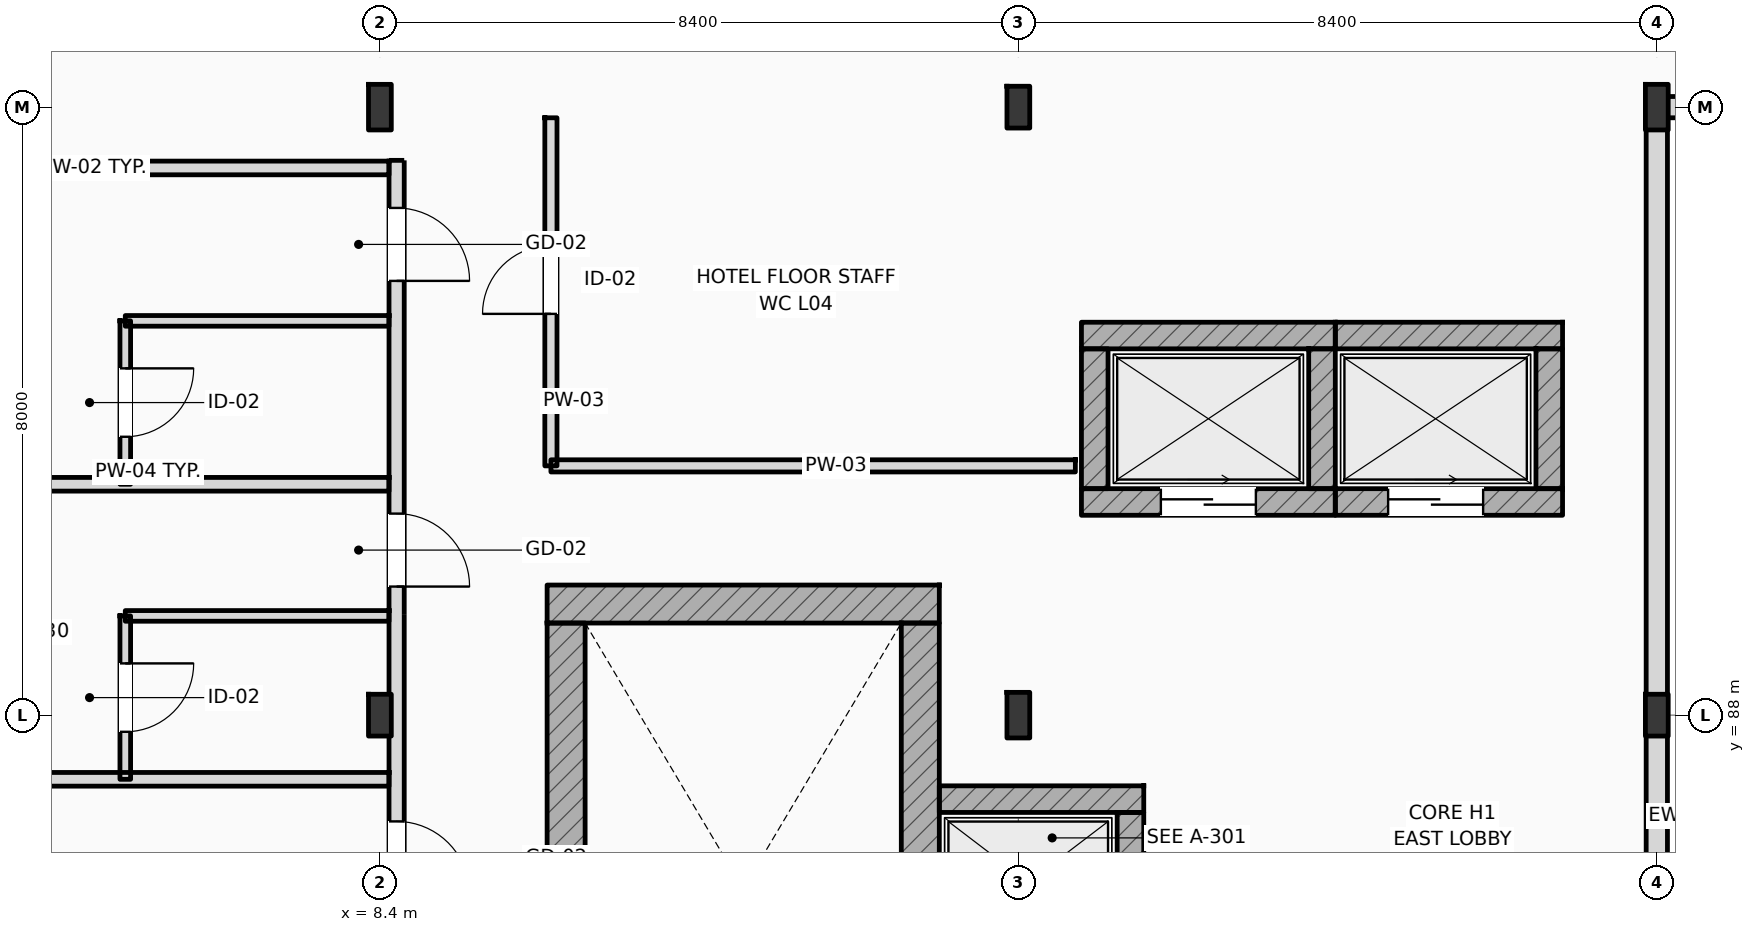
"""IFC4 building model, lengths in metres.
Left out: names, types, materials, properties, quantities, classifications, styles, units other than length and angle.
Written with IfcOpenShell. Run it as: python <this file> out.ifc"""

import sys

from ifc_helpers import new_model, si_unit, direction, frame, frame_2d, origin, origin_2d, place, context, subcontext, project, spatial, rectangle, i_section, extrude, element, fill, save


model = new_model("IFC4")
c1 = context("Model", 3, precision=1e-05, world=origin(), true_north=direction((0.0, 1.0)))
c2 = subcontext(c1, "Body", "Model", "MODEL_VIEW")
j1 = project(units=[si_unit("LENGTHUNIT", "METRE"), si_unit("PLANEANGLEUNIT", "RADIAN")], contexts=[c1])
p1 = place(None, origin())
s1 = spatial("IfcSite", under=j1, at=p1, CompositionType="ELEMENT")
p2 = place(p1, origin())
s2 = spatial("IfcBuilding", under=s1, at=p2, CompositionType="ELEMENT")
p3 = place(p2, frame((0.0, 0.0, 20.4)))
s3 = spatial("IfcBuildingStorey", under=s2, at=p3, CompositionType="ELEMENT", Elevation=20.4)
p4 = place(p3, frame((8.4, 88.0, 0.0), z_axis=(0.0, 0.0, 1.0), x_axis=(1.0, 0.0, 0.0)))
e1 = element("IfcColumn", 1, at=p4, inside=s3, PredefinedType="COLUMN", context=c2, shape_type="SweptSolid", body=[
    extrude(i_section(OverallWidth=0.3, OverallDepth=0.55, WebThickness=0.015, FlangeThickness=0.029, FilletRadius=0.027, at=origin_2d()), origin(), (0.0, 0.0, 1.0), 4.2),
])
for number, where, z_axis, x_axis in (
    (2, (8.4, 96.0, 0.0), (0.0, 0.0, 1.0), (1.0, 0.0, 0.0)),
    (3, (16.8, 88.0, 0.0), (0.0, 0.0, 1.0), (1.0, 0.0, 0.0)),
):
    element("IfcColumn", number, at=place(p3, frame(where, z_axis=z_axis, x_axis=x_axis)), inside=s3, PredefinedType="COLUMN", context=c2, shape_type="SweptSolid", body=[
        extrude(i_section(OverallWidth=0.3, OverallDepth=0.6, WebThickness=0.015, FlangeThickness=0.03, FilletRadius=0.027, at=origin_2d()), origin(), (0.0, 0.0, 1.0), 4.2),
    ])
for number, where, z_axis, x_axis in (
    (4, (16.8, 96.0, 0.0), (0.0, 0.0, 1.0), (1.0, 0.0, 0.0)),
    (5, (25.2, 88.0, 0.0), (0.0, 0.0, 1.0), (1.0, 0.0, 0.0)),
):
    element("IfcColumn", number, at=place(p3, frame(where, z_axis=z_axis, x_axis=x_axis)), inside=s3, PredefinedType="COLUMN", context=c2, shape_type="SweptSolid", body=[
        extrude(i_section(OverallWidth=0.3, OverallDepth=0.55, WebThickness=0.015, FlangeThickness=0.029, FilletRadius=0.027, at=origin_2d()), origin(), (0.0, 0.0, 1.0), 4.2),
    ])
p5 = place(p3, frame((25.2, 96.0, 0.0), z_axis=(0.0, 0.0, 1.0), x_axis=(1.0, 0.0, 0.0)))
e6 = element("IfcColumn", 6, at=p5, inside=s3, PredefinedType="COLUMN", context=c2, shape_type="SweptSolid", body=[
    extrude(i_section(OverallWidth=0.3, OverallDepth=0.6, WebThickness=0.015, FlangeThickness=0.03, FilletRadius=0.027, at=origin_2d()), origin(), (0.0, 0.0, 1.0), 4.2),
])
p6 = place(p3, frame((10.6, 89.462, 0.0), z_axis=(0.0, 0.0, 1.0), x_axis=(1.0, 0.0, 0.0)))
e7 = element("IfcWall", 7, at=p6, inside=s3, PredefinedType="SHEAR", context=c2, shape_type="SweptSolid", body=[
    extrude(rectangle(XDim=5.16, YDim=0.5, at=frame_2d((2.58, 0.0))), origin(), (0.0, 0.0, 1.0), 4.2),
])
p7 = place(p3, frame((10.85, 80.1, 0.0), z_axis=(0.0, 0.0, 1.0), x_axis=(0.0, 1.0, 0.0)))
e8 = element("IfcWall", 8, at=p7, inside=s3, PredefinedType="SHEAR", context=c2, shape_type="SweptSolid", body=[
    extrude(rectangle(XDim=9.112, YDim=0.5, at=frame_2d((4.556, 0.0))), origin(), (0.0, 0.0, 1.0), 4.2),
])
p8 = place(p3, frame((15.51, 80.1, 0.0), z_axis=(0.0, 0.0, 1.0), x_axis=(0.0, 1.0, 0.0)))
e9 = element("IfcWall", 9, at=p8, inside=s3, PredefinedType="SHEAR", context=c2, shape_type="SweptSolid", body=[
    extrude(rectangle(XDim=9.112, YDim=0.5, at=frame_2d((4.556, 0.0))), origin(), (0.0, 0.0, 1.0), 4.2),
])
p9 = place(p8, frame((0.44, 0.0, 0.0)))
e10 = element("IfcOpeningElement", 10, at=p9, cuts=e9, PredefinedType="OPENING", context=c2, shape_type="SweptSolid", body=[
    extrude(rectangle(XDim=1.1, YDim=2.2, at=frame_2d((0.55, 1.1))), frame((0.0, 0.26, 0.0), z_axis=(0.0, -1.0, 0.0), x_axis=(1.0, 0.0, 0.0)), (0.0, 0.0, 1.0), 0.52),
])
p10 = place(p3, frame((25.2, 96.0, 0.0), z_axis=(0.0, 0.0, 1.0), x_axis=(1.0, 0.0, 0.0)))
e11 = element("IfcWall", 11, at=p10, inside=s3, PredefinedType="STANDARD", context=c2, shape_type="SweptSolid", body=[
    extrude(rectangle(XDim=23.4, YDim=0.28, at=frame_2d((11.7, 0.0))), origin(), (0.0, 0.0, 1.0), 3.48),
])
p11 = place(p3, frame((25.2, 79.5, 0.0), z_axis=(0.0, 0.0, 1.0), x_axis=(0.0, 1.0, 0.0)))
e12 = element("IfcWall", 12, at=p11, inside=s3, PredefinedType="STANDARD", context=c2, shape_type="SweptSolid", body=[
    extrude(rectangle(XDim=16.5, YDim=0.28, at=frame_2d((8.25, 0.0))), origin(), (0.0, 0.0, 1.0), 3.53),
])
p12 = place(p3, frame((15.76, 86.895, 0.0), z_axis=(0.0, 0.0, 1.0), x_axis=(1.0, 0.0, 0.0)))
e13 = element("IfcWall", 13, at=p12, inside=s3, PredefinedType="SHEAR", context=c2, shape_type="SweptSolid", body=[
    extrude(rectangle(XDim=2.69, YDim=0.35, at=frame_2d((1.345, 0.0))), origin(), (0.0, 0.0, 1.0), 3.94),
])
p13 = place(p3, frame((18.275, 84.88, 0.0), z_axis=(0.0, 0.0, 1.0), x_axis=(0.0, 1.0, 0.0)))
e14 = element("IfcWall", 14, at=p13, inside=s3, PredefinedType="SHEAR", context=c2, shape_type="SweptSolid", body=[
    extrude(rectangle(XDim=1.84, YDim=0.35, at=frame_2d((0.92, 0.0))), origin(), (0.0, 0.0, 1.0), 3.94),
])
p14 = place(p3, frame((17.63, 92.995, 0.0), z_axis=(0.0, 0.0, 1.0), x_axis=(1.0, 0.0, 0.0)))
e15 = element("IfcWall", 15, at=p14, inside=s3, PredefinedType="SHEAR", context=c2, shape_type="SweptSolid", body=[
    extrude(rectangle(XDim=3.34, YDim=0.35, at=frame_2d((1.67, 0.0))), origin(), (0.0, 0.0, 1.0), 3.94),
])
p15 = place(p3, frame((17.63, 90.805, 0.0), z_axis=(0.0, 0.0, 1.0), x_axis=(1.0, 0.0, 0.0)))
e16 = element("IfcWall", 16, at=p15, inside=s3, PredefinedType="SHEAR", context=c2, shape_type="SweptSolid", body=[
    extrude(rectangle(XDim=3.34, YDim=0.35, at=frame_2d((1.67, 0.0))), origin(), (0.0, 0.0, 1.0), 3.94),
])
p16 = place(p15, frame((1.045, 0.0, 0.0)))
e17 = element("IfcOpeningElement", 17, at=p16, cuts=e16, PredefinedType="OPENING", context=c2, shape_type="SweptSolid", body=[
    extrude(rectangle(XDim=1.25, YDim=2.25, at=frame_2d((0.625, 1.125))), frame((0.0, 0.185, 0.0), z_axis=(0.0, -1.0, 0.0), x_axis=(1.0, 0.0, 0.0)), (0.0, 0.0, 1.0), 0.37),
])
for number, where, z_axis, x_axis in (
    (18, (17.805, 90.98, 0.0), (0.0, 0.0, 1.0), (0.0, 1.0, 0.0)),
    (19, (20.795, 90.98, 0.0), (0.0, 0.0, 1.0), (0.0, 1.0, 0.0)),
):
    element("IfcWall", number, at=place(p3, frame(where, z_axis=z_axis, x_axis=x_axis)), inside=s3, PredefinedType="SHEAR", context=c2, shape_type="SweptSolid", body=[
        extrude(rectangle(XDim=1.84, YDim=0.35, at=frame_2d((0.92, 0.0))), origin(), (0.0, 0.0, 1.0), 3.94),
    ])
p17 = place(p3, frame((20.97, 92.995, 0.0), z_axis=(0.0, 0.0, 1.0), x_axis=(1.0, 0.0, 0.0)))
e20 = element("IfcWall", 20, at=p17, inside=s3, PredefinedType="SHEAR", context=c2, shape_type="SweptSolid", body=[
    extrude(rectangle(XDim=2.99, YDim=0.35, at=frame_2d((1.495, 0.0))), origin(), (0.0, 0.0, 1.0), 3.94),
])
p18 = place(p3, frame((20.97, 90.805, 0.0), z_axis=(0.0, 0.0, 1.0), x_axis=(1.0, 0.0, 0.0)))
e21 = element("IfcWall", 21, at=p18, inside=s3, PredefinedType="SHEAR", context=c2, shape_type="SweptSolid", body=[
    extrude(rectangle(XDim=2.99, YDim=0.35, at=frame_2d((1.495, 0.0))), origin(), (0.0, 0.0, 1.0), 3.94),
])
p19 = place(p18, frame((0.695, 0.0, 0.0)))
e22 = element("IfcOpeningElement", 22, at=p19, cuts=e21, PredefinedType="OPENING", context=c2, shape_type="SweptSolid", body=[
    extrude(rectangle(XDim=1.25, YDim=2.25, at=frame_2d((0.625, 1.125))), frame((0.0, 0.185, 0.0), z_axis=(0.0, -1.0, 0.0), x_axis=(1.0, 0.0, 0.0)), (0.0, 0.0, 1.0), 0.37),
])
p20 = place(p3, frame((23.785, 90.98, 0.0), z_axis=(0.0, 0.0, 1.0), x_axis=(0.0, 1.0, 0.0)))
e23 = element("IfcWall", 23, at=p20, inside=s3, PredefinedType="SHEAR", context=c2, shape_type="SweptSolid", body=[
    extrude(rectangle(XDim=1.84, YDim=0.35, at=frame_2d((0.92, 0.0))), origin(), (0.0, 0.0, 1.0), 3.94),
])
p21 = place(p3, frame((8.62, 62.64, 0.0), z_axis=(0.0, 0.0, 1.0), x_axis=(0.0, 1.0, 0.0)))
e24 = element("IfcWall", 24, at=p21, inside=s3, PredefinedType="PARTITIONING", context=c2, shape_type="SweptSolid", body=[
    extrude(rectangle(XDim=32.66, YDim=0.2, at=frame_2d((16.33, 0.0))), origin(), (0.0, 0.0, 1.0), 3.53),
])
p22 = place(p21, frame((2.724, 0.0, 0.0)))
e25 = element("IfcOpeningElement", 25, at=p22, cuts=e24, PredefinedType="OPENING", context=c2, shape_type="SweptSolid", body=[
    extrude(rectangle(XDim=0.96, YDim=2.2, at=frame_2d((0.48, 1.1))), frame((0.0, 0.11, 0.0), z_axis=(0.0, -1.0, 0.0), x_axis=(1.0, 0.0, 0.0)), (0.0, 0.0, 1.0), 0.22),
])
p23 = place(p21, frame((4.652, 0.0, 0.0)))
e26 = element("IfcOpeningElement", 26, at=p23, cuts=e24, PredefinedType="OPENING", context=c2, shape_type="SweptSolid", body=[
    extrude(rectangle(XDim=0.96, YDim=2.2, at=frame_2d((0.48, 1.1))), frame((0.0, 0.11, 0.0), z_axis=(0.0, -1.0, 0.0), x_axis=(1.0, 0.0, 0.0)), (0.0, 0.0, 1.0), 0.22),
])
p24 = place(p21, frame((10.852, 0.0, 0.0)))
e27 = element("IfcOpeningElement", 27, at=p24, cuts=e24, PredefinedType="OPENING", context=c2, shape_type="SweptSolid", body=[
    extrude(rectangle(XDim=0.96, YDim=2.2, at=frame_2d((0.48, 1.1))), frame((0.0, 0.11, 0.0), z_axis=(0.0, -1.0, 0.0), x_axis=(1.0, 0.0, 0.0)), (0.0, 0.0, 1.0), 0.22),
])
p25 = place(p21, frame((12.752, 0.0, 0.0)))
e28 = element("IfcOpeningElement", 28, at=p25, cuts=e24, PredefinedType="OPENING", context=c2, shape_type="SweptSolid", body=[
    extrude(rectangle(XDim=0.96, YDim=2.2, at=frame_2d((0.48, 1.1))), frame((0.0, 0.11, 0.0), z_axis=(0.0, -1.0, 0.0), x_axis=(1.0, 0.0, 0.0)), (0.0, 0.0, 1.0), 0.22),
])
p26 = place(p21, frame((18.952, 0.0, 0.0)))
e29 = element("IfcOpeningElement", 29, at=p26, cuts=e24, PredefinedType="OPENING", context=c2, shape_type="SweptSolid", body=[
    extrude(rectangle(XDim=0.96, YDim=2.2, at=frame_2d((0.48, 1.1))), frame((0.0, 0.11, 0.0), z_axis=(0.0, -1.0, 0.0), x_axis=(1.0, 0.0, 0.0)), (0.0, 0.0, 1.0), 0.22),
])
p27 = place(p21, frame((23.002, 0.0, 0.0)))
e30 = element("IfcOpeningElement", 30, at=p27, cuts=e24, PredefinedType="OPENING", context=c2, shape_type="SweptSolid", body=[
    extrude(rectangle(XDim=0.96, YDim=2.2, at=frame_2d((0.48, 1.1))), frame((0.0, 0.11, 0.0), z_axis=(0.0, -1.0, 0.0), x_axis=(1.0, 0.0, 0.0)), (0.0, 0.0, 1.0), 0.22),
])
p28 = place(p21, frame((27.052, 0.0, 0.0)))
e31 = element("IfcOpeningElement", 31, at=p28, cuts=e24, PredefinedType="OPENING", context=c2, shape_type="SweptSolid", body=[
    extrude(rectangle(XDim=0.96, YDim=2.2, at=frame_2d((0.48, 1.1))), frame((0.0, 0.11, 0.0), z_axis=(0.0, -1.0, 0.0), x_axis=(1.0, 0.0, 0.0)), (0.0, 0.0, 1.0), 0.22),
])
p29 = place(p21, frame((31.074, 0.0, 0.0)))
e32 = element("IfcOpeningElement", 32, at=p29, cuts=e24, PredefinedType="OPENING", context=c2, shape_type="SweptSolid", body=[
    extrude(rectangle(XDim=0.96, YDim=2.2, at=frame_2d((0.48, 1.1))), frame((0.0, 0.11, 0.0), z_axis=(0.0, -1.0, 0.0), x_axis=(1.0, 0.0, 0.0)), (0.0, 0.0, 1.0), 0.22),
])
p30 = place(p3, frame((10.65, 91.28, 0.0), z_axis=(0.0, 0.0, 1.0), x_axis=(0.0, 1.0, 0.0)))
e33 = element("IfcWall", 33, at=p30, inside=s3, PredefinedType="PARTITIONING", context=c2, shape_type="SweptSolid", body=[
    extrude(rectangle(XDim=4.58, YDim=0.16, at=frame_2d((2.29, 0.0))), origin(), (0.0, 0.0, 1.0), 3.94),
])
p31 = place(p30, frame((2.0, 0.0, 0.0)))
e34 = element("IfcOpeningElement", 34, at=p31, cuts=e33, PredefinedType="OPENING", context=c2, shape_type="SweptSolid", body=[
    extrude(rectangle(XDim=0.9, YDim=2.1, at=frame_2d((0.45, 1.05))), frame((0.0, 0.09, 0.0), z_axis=(0.0, -1.0, 0.0), x_axis=(1.0, 0.0, 0.0)), (0.0, 0.0, 1.0), 0.18),
])
p32 = place(p3, frame((10.65, 91.28, 0.0), z_axis=(0.0, 0.0, 1.0), x_axis=(1.0, 0.0, 0.0)))
e35 = element("IfcWall", 35, at=p32, inside=s3, PredefinedType="PARTITIONING", context=c2, shape_type="SweptSolid", body=[
    extrude(rectangle(XDim=6.9, YDim=0.16, at=frame_2d((3.45, 0.0))), origin(), (0.0, 0.0, 1.0), 3.94),
])
for number, where, z_axis, x_axis in (
    (36, (0.15, 87.156, 0.0), (0.0, 0.0, 1.0), (1.0, 0.0, 0.0)),
    (37, (0.15, 91.038, 0.0), (0.0, 0.0, 1.0), (1.0, 0.0, 0.0)),
):
    element("IfcWall", number, at=place(p3, frame(where, z_axis=z_axis, x_axis=x_axis)), inside=s3, PredefinedType="PARTITIONING", context=c2, shape_type="SweptSolid", body=[
        extrude(rectangle(XDim=8.37, YDim=0.18, at=frame_2d((4.185, 0.0))), origin(), (0.0, 0.0, 1.0), 3.94),
    ])
p33 = place(p3, frame((5.05, 89.306, 0.0), z_axis=(0.0, 0.0, 1.0), x_axis=(1.0, 0.0, 0.0)))
e38 = element("IfcWall", 38, at=p33, inside=s3, PredefinedType="PARTITIONING", context=c2, shape_type="SweptSolid", body=[
    extrude(rectangle(XDim=3.47, YDim=0.14, at=frame_2d((1.735, 0.0))), origin(), (0.0, 0.0, 1.0), 3.94),
])
p34 = place(p3, frame((5.05, 87.156, 0.0), z_axis=(0.0, 0.0, 1.0), x_axis=(0.0, 1.0, 0.0)))
e39 = element("IfcWall", 39, at=p34, inside=s3, PredefinedType="PARTITIONING", context=c2, shape_type="SweptSolid", body=[
    extrude(rectangle(XDim=2.15, YDim=0.14, at=frame_2d((1.075, 0.0))), origin(), (0.0, 0.0, 1.0), 3.94),
])
p35 = place(p34, frame((0.625, 0.0, 0.0)))
e40 = element("IfcOpeningElement", 40, at=p35, cuts=e39, PredefinedType="OPENING", context=c2, shape_type="SweptSolid", body=[
    extrude(rectangle(XDim=0.9, YDim=2.1, at=frame_2d((0.45, 1.05))), frame((0.0, 0.08, 0.0), z_axis=(0.0, -1.0, 0.0), x_axis=(1.0, 0.0, 0.0)), (0.0, 0.0, 1.0), 0.16),
])
p36 = place(p3, frame((0.15, 95.2, 0.0), z_axis=(0.0, 0.0, 1.0), x_axis=(1.0, 0.0, 0.0)))
e41 = element("IfcWall", 41, at=p36, inside=s3, PredefinedType="PARTITIONING", context=c2, shape_type="SweptSolid", body=[
    extrude(rectangle(XDim=8.37, YDim=0.18, at=frame_2d((4.185, 0.0))), origin(), (0.0, 0.0, 1.0), 3.94),
])
p37 = place(p3, frame((5.05, 93.188, 0.0), z_axis=(0.0, 0.0, 1.0), x_axis=(1.0, 0.0, 0.0)))
e42 = element("IfcWall", 42, at=p37, inside=s3, PredefinedType="PARTITIONING", context=c2, shape_type="SweptSolid", body=[
    extrude(rectangle(XDim=3.47, YDim=0.14, at=frame_2d((1.735, 0.0))), origin(), (0.0, 0.0, 1.0), 3.94),
])
p38 = place(p3, frame((5.05, 91.038, 0.0), z_axis=(0.0, 0.0, 1.0), x_axis=(0.0, 1.0, 0.0)))
e43 = element("IfcWall", 43, at=p38, inside=s3, PredefinedType="PARTITIONING", context=c2, shape_type="SweptSolid", body=[
    extrude(rectangle(XDim=2.15, YDim=0.14, at=frame_2d((1.075, 0.0))), origin(), (0.0, 0.0, 1.0), 3.94),
])
p39 = place(p38, frame((0.625, 0.0, 0.0)))
e44 = element("IfcOpeningElement", 44, at=p39, cuts=e43, PredefinedType="OPENING", context=c2, shape_type="SweptSolid", body=[
    extrude(rectangle(XDim=0.9, YDim=2.1, at=frame_2d((0.45, 1.05))), frame((0.0, 0.08, 0.0), z_axis=(0.0, -1.0, 0.0), x_axis=(1.0, 0.0, 0.0)), (0.0, 0.0, 1.0), 0.16),
])
p40 = place(p16, origin())
e45 = element("IfcDoor", 45, at=p40, inside=s3, OperationType="SLIDING_TO_LEFT", PredefinedType="DOOR", context=c2, shape_type="SweptSolid", body=[
    extrude(rectangle(XDim=1.25, YDim=2.25, at=frame_2d((0.625, 1.125))), frame((0.0, 0.025, 0.0), z_axis=(0.0, -1.0, 0.0), x_axis=(1.0, 0.0, 0.0)), (0.0, 0.0, 1.0), 0.05),
])
fill(e17, e45)
p41 = place(p19, origin())
e46 = element("IfcDoor", 46, at=p41, inside=s3, OperationType="SLIDING_TO_LEFT", PredefinedType="DOOR", context=c2, shape_type="SweptSolid", body=[
    extrude(rectangle(XDim=1.25, YDim=2.25, at=frame_2d((0.625, 1.125))), frame((0.0, 0.025, 0.0), z_axis=(0.0, -1.0, 0.0), x_axis=(1.0, 0.0, 0.0)), (0.0, 0.0, 1.0), 0.05),
])
fill(e22, e46)
p42 = place(p27, frame((0.96, 0.0, 0.0), z_axis=(0.0, 0.0, 1.0), x_axis=(-1.0, 0.0, 0.0)))
e47 = element("IfcDoor", 47, at=p42, inside=s3, OperationType="SINGLE_SWING_LEFT", PredefinedType="DOOR", context=c2, shape_type="SweptSolid", body=[
    extrude(rectangle(XDim=0.96, YDim=2.2, at=frame_2d((0.48, 1.1))), frame((0.0, 0.025, 0.0), z_axis=(0.0, -1.0, 0.0), x_axis=(1.0, 0.0, 0.0)), (0.0, 0.0, 1.0), 0.05),
])
fill(e30, e47)
p43 = place(p28, frame((0.96, 0.0, 0.0), z_axis=(0.0, 0.0, 1.0), x_axis=(-1.0, 0.0, 0.0)))
e48 = element("IfcDoor", 48, at=p43, inside=s3, OperationType="SINGLE_SWING_LEFT", PredefinedType="DOOR", context=c2, shape_type="SweptSolid", body=[
    extrude(rectangle(XDim=0.96, YDim=2.2, at=frame_2d((0.48, 1.1))), frame((0.0, 0.025, 0.0), z_axis=(0.0, -1.0, 0.0), x_axis=(1.0, 0.0, 0.0)), (0.0, 0.0, 1.0), 0.05),
])
fill(e31, e48)
p44 = place(p35, frame((0.9, 0.0, 0.0), z_axis=(0.0, 0.0, 1.0), x_axis=(-1.0, 0.0, 0.0)))
e49 = element("IfcDoor", 49, at=p44, inside=s3, OperationType="SINGLE_SWING_RIGHT", PredefinedType="DOOR", context=c2, shape_type="SweptSolid", body=[
    extrude(rectangle(XDim=0.9, YDim=2.1, at=frame_2d((0.45, 1.05))), frame((0.0, 0.025, 0.0), z_axis=(0.0, -1.0, 0.0), x_axis=(1.0, 0.0, 0.0)), (0.0, 0.0, 1.0), 0.05),
])
fill(e40, e49)
p45 = place(p29, frame((0.96, 0.0, 0.0), z_axis=(0.0, 0.0, 1.0), x_axis=(-1.0, 0.0, 0.0)))
e50 = element("IfcDoor", 50, at=p45, inside=s3, OperationType="SINGLE_SWING_LEFT", PredefinedType="DOOR", context=c2, shape_type="SweptSolid", body=[
    extrude(rectangle(XDim=0.96, YDim=2.2, at=frame_2d((0.48, 1.1))), frame((0.0, 0.025, 0.0), z_axis=(0.0, -1.0, 0.0), x_axis=(1.0, 0.0, 0.0)), (0.0, 0.0, 1.0), 0.05),
])
fill(e32, e50)
p46 = place(p39, frame((0.9, 0.0, 0.0), z_axis=(0.0, 0.0, 1.0), x_axis=(-1.0, 0.0, 0.0)))
e51 = element("IfcDoor", 51, at=p46, inside=s3, OperationType="SINGLE_SWING_RIGHT", PredefinedType="DOOR", context=c2, shape_type="SweptSolid", body=[
    extrude(rectangle(XDim=0.9, YDim=2.1, at=frame_2d((0.45, 1.05))), frame((0.0, 0.025, 0.0), z_axis=(0.0, -1.0, 0.0), x_axis=(1.0, 0.0, 0.0)), (0.0, 0.0, 1.0), 0.05),
])
fill(e44, e51)
p47 = place(p31, origin())
e52 = element("IfcDoor", 52, at=p47, inside=s3, OperationType="SINGLE_SWING_LEFT", PredefinedType="DOOR", context=c2, shape_type="SweptSolid", body=[
    extrude(rectangle(XDim=0.9, YDim=2.1, at=frame_2d((0.45, 1.05))), frame((0.0, 0.025, 0.0), z_axis=(0.0, -1.0, 0.0), x_axis=(1.0, 0.0, 0.0)), (0.0, 0.0, 1.0), 0.05),
])
fill(e34, e52)
save(model, sys.argv[1])
